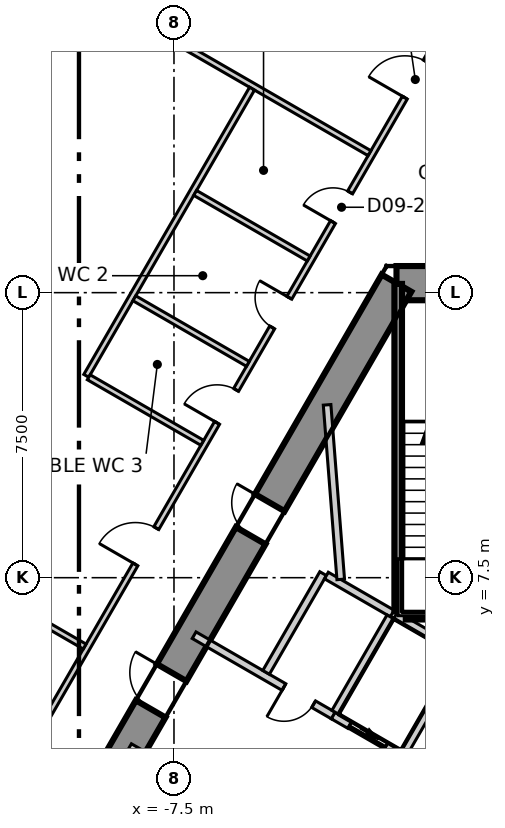
"""IFC4 building model, lengths in metres.
Left out: names, types, materials, properties, quantities, classifications, styles, units other than length and angle.
Written with IfcOpenShell. Run it as: python <this file> out.ifc"""

import sys

from ifc_helpers import new_model, si_unit, direction, frame, frame_2d, origin, place, context, subcontext, project, spatial, polyline, rectangle, outline, extrude, element, fill, save


model = new_model("IFC4")
c1 = context("Model", 3, precision=1e-05, world=origin(), true_north=direction((0.0, 1.0)))
c2 = subcontext(c1, "Body", "Model", "MODEL_VIEW")
j1 = project(units=[si_unit("LENGTHUNIT", "METRE"), si_unit("PLANEANGLEUNIT", "RADIAN")], contexts=[c1])
p1 = place(None, origin())
s1 = spatial("IfcSite", under=j1, at=p1, CompositionType="ELEMENT")
p2 = place(p1, origin())
s2 = spatial("IfcBuilding", under=s1, at=p2, CompositionType="ELEMENT")
p3 = place(p2, frame((0.0, 0.0, 47.3)))
s3 = spatial("IfcBuildingStorey", under=s2, at=p3, CompositionType="ELEMENT", Elevation=47.3)
p4 = place(p3, frame((1.645, 15.25, -0.3), z_axis=(0.0, 0.0, 1.0), x_axis=(-1.0, 0.0, 0.0)))
e1 = element("IfcWall", 1, at=p4, inside=s3, PredefinedType="SHEAR", context=c2, shape_type="SweptSolid", body=[
    extrude(outline(polyline([(-0.26, -0.45), (1.645, -0.45), (3.55, -0.45), (3.031, 0.45), (1.645, 0.45), (0.259, 0.45), (-0.26, -0.45)])), origin(), (0.0, 0.0, 1.0), 4.0),
])
p5 = place(p4, frame((0.945, 0.0, 0.3)))
e2 = element("IfcOpeningElement", 2, at=p5, cuts=e1, PredefinedType="OPENING", context=c2, shape_type="SweptSolid", body=[
    extrude(rectangle(XDim=1.4, YDim=2.1, at=frame_2d((0.7, 1.05))), frame((0.0, 0.46, 0.0), z_axis=(0.0, -1.0, 0.0), x_axis=(1.0, 0.0, 0.0)), (0.0, 0.0, 1.0), 0.92),
])
p6 = place(p3, frame((-1.645, 15.25, -0.3), z_axis=(0.0, 0.0, 1.0), x_axis=(-0.500026485275, -0.866010111964, 0.0)))
e3 = element("IfcWall", 3, at=p6, inside=s3, PredefinedType="SHEAR", context=c2, shape_type="SweptSolid", body=[
    extrude(outline(polyline([(-0.26, -0.45), (1.685, -0.45), (3.63, -0.45), (5.576, -0.45), (7.521, -0.45), (9.466, -0.449), (11.411, -0.449), (13.357, -0.449), (15.302, -0.449), (17.247, -0.449), (19.192, -0.449), (21.138, -0.449), (23.083, -0.449), (25.028, -0.449), (24.509, 0.45), (22.644, 0.45), (20.778, 0.45), (18.913, 0.45), (17.048, 0.45), (15.182, 0.449), (13.317, 0.449), (11.452, 0.449), (9.587, 0.449), (7.721, 0.449), (5.856, 0.449), (3.991, 0.449), (2.125, 0.449), (0.26, 0.449), (-0.26, -0.45)])), origin(), (0.0, 0.0, 1.0), 4.0),
])
p7 = place(p6, frame((11.834, 0.0, 0.3)))
e4 = element("IfcOpeningElement", 4, at=p7, cuts=e3, PredefinedType="OPENING", context=c2, shape_type="SweptSolid", body=[
    extrude(rectangle(XDim=1.1, YDim=2.1, at=frame_2d((0.55, 1.05))), frame((0.0, 0.46, 0.0), z_axis=(0.0, -1.0, 0.0), x_axis=(1.0, 0.0, 0.0)), (0.0, 0.0, 1.0), 0.92),
])
p8 = place(p6, frame((6.671, 0.0, 0.3)))
e5 = element("IfcOpeningElement", 5, at=p8, cuts=e3, PredefinedType="OPENING", context=c2, shape_type="SweptSolid", body=[
    extrude(rectangle(XDim=1.0, YDim=2.1, at=frame_2d((0.5, 1.05))), frame((0.0, 0.46, 0.0), z_axis=(0.0, -1.0, 0.0), x_axis=(1.0, 0.0, 0.0)), (0.0, 0.0, 1.0), 0.92),
])
p9 = place(p3, frame((-3.417, 38.096, 0.0), z_axis=(0.0, 0.0, 1.0), x_axis=(-0.500000412988, -0.866025165346, 0.0)))
e6 = element("IfcWall", 6, at=p9, inside=s3, PredefinedType="ELEMENTEDWALL", context=c2, shape_type="SweptSolid", body=[
    extrude(rectangle(XDim=62.548, YDim=0.2, at=frame_2d((31.274, 0.0))), origin(), (0.0, 0.0, 1.0), 3.7),
])
p10 = place(p9, frame((2.25, 0.0, 0.9)))
e7 = element("IfcOpeningElement", 7, at=p10, cuts=e6, PredefinedType="OPENING", context=c2, shape_type="SweptSolid", body=[
    extrude(rectangle(XDim=5.6, YDim=2.5, at=frame_2d((2.8, 1.25))), frame((0.0, 0.11, 0.0), z_axis=(0.0, -1.0, 0.0), x_axis=(1.0, 0.0, 0.0)), (0.0, 0.0, 1.0), 0.22),
])
p11 = place(p9, frame((9.745, 0.0, 0.9)))
e8 = element("IfcOpeningElement", 8, at=p11, cuts=e6, PredefinedType="OPENING", context=c2, shape_type="SweptSolid", body=[
    extrude(rectangle(XDim=5.6, YDim=2.5, at=frame_2d((2.8, 1.25))), frame((0.0, 0.11, 0.0), z_axis=(0.0, -1.0, 0.0), x_axis=(1.0, 0.0, 0.0)), (0.0, 0.0, 1.0), 0.22),
])
p12 = place(p9, frame((17.241, 0.0, 0.9)))
e9 = element("IfcOpeningElement", 9, at=p12, cuts=e6, PredefinedType="OPENING", context=c2, shape_type="SweptSolid", body=[
    extrude(rectangle(XDim=5.6, YDim=2.5, at=frame_2d((2.8, 1.25))), frame((0.0, 0.11, 0.0), z_axis=(0.0, -1.0, 0.0), x_axis=(1.0, 0.0, 0.0)), (0.0, 0.0, 1.0), 0.22),
])
p13 = place(p9, frame((24.736, 0.0, 0.9)))
e10 = element("IfcOpeningElement", 10, at=p13, cuts=e6, PredefinedType="OPENING", context=c2, shape_type="SweptSolid", body=[
    extrude(rectangle(XDim=5.6, YDim=2.5, at=frame_2d((2.8, 1.25))), frame((0.0, 0.11, 0.0), z_axis=(0.0, -1.0, 0.0), x_axis=(1.0, 0.0, 0.0)), (0.0, 0.0, 1.0), 0.22),
])
p14 = place(p9, frame((32.231, 0.0, 0.9)))
e11 = element("IfcOpeningElement", 11, at=p14, cuts=e6, PredefinedType="OPENING", context=c2, shape_type="SweptSolid", body=[
    extrude(rectangle(XDim=5.6, YDim=2.5, at=frame_2d((2.8, 1.25))), frame((0.0, 0.11, 0.0), z_axis=(0.0, -1.0, 0.0), x_axis=(1.0, 0.0, 0.0)), (0.0, 0.0, 1.0), 0.22),
])
p15 = place(p9, frame((39.727, 0.0, 0.9)))
e12 = element("IfcOpeningElement", 12, at=p15, cuts=e6, PredefinedType="OPENING", context=c2, shape_type="SweptSolid", body=[
    extrude(rectangle(XDim=5.6, YDim=2.5, at=frame_2d((2.8, 1.25))), frame((0.0, 0.11, 0.0), z_axis=(0.0, -1.0, 0.0), x_axis=(1.0, 0.0, 0.0)), (0.0, 0.0, 1.0), 0.22),
])
p16 = place(p9, frame((47.222, 0.0, 0.9)))
e13 = element("IfcOpeningElement", 13, at=p16, cuts=e6, PredefinedType="OPENING", context=c2, shape_type="SweptSolid", body=[
    extrude(rectangle(XDim=5.6, YDim=2.5, at=frame_2d((2.8, 1.25))), frame((0.0, 0.11, 0.0), z_axis=(0.0, -1.0, 0.0), x_axis=(1.0, 0.0, 0.0)), (0.0, 0.0, 1.0), 0.22),
])
p17 = place(p9, frame((54.717, 0.0, 0.9)))
e14 = element("IfcOpeningElement", 14, at=p17, cuts=e6, PredefinedType="OPENING", context=c2, shape_type="SweptSolid", body=[
    extrude(rectangle(XDim=5.6, YDim=2.5, at=frame_2d((2.8, 1.25))), frame((0.0, 0.11, 0.0), z_axis=(0.0, -1.0, 0.0), x_axis=(1.0, 0.0, 0.0)), (0.0, 0.0, 1.0), 0.22),
])
p18 = place(p3, frame((-19.497, -11.17, 0.0), z_axis=(0.0, 0.0, 1.0), x_axis=(0.499998854553, 0.866026065108, 0.0)))
e15 = element("IfcWall", 15, at=p18, inside=s3, PredefinedType="PARTITIONING", context=c2, shape_type="SweptSolid", body=[
    extrude(rectangle(XDim=38.994, YDim=0.15, at=frame_2d((19.497, 0.0))), origin(), (0.0, 0.0, 1.0), 3.7),
])
p19 = place(p18, frame((36.144, 0.0, 0.0)))
e16 = element("IfcOpeningElement", 16, at=p19, cuts=e15, PredefinedType="OPENING", context=c2, shape_type="SweptSolid", body=[
    extrude(rectangle(XDim=1.1, YDim=2.1, at=frame_2d((0.55, 1.05))), frame((0.0, 0.085, 0.0), z_axis=(0.0, -1.0, 0.0), x_axis=(1.0, 0.0, 0.0)), (0.0, 0.0, 1.0), 0.17),
])
p20 = place(p18, frame((21.963, 0.0, 0.0)))
e17 = element("IfcOpeningElement", 17, at=p20, cuts=e15, PredefinedType="OPENING", context=c2, shape_type="SweptSolid", body=[
    extrude(rectangle(XDim=1.1, YDim=2.1, at=frame_2d((0.55, 1.05))), frame((0.0, 0.085, 0.0), z_axis=(0.0, -1.0, 0.0), x_axis=(1.0, 0.0, 0.0)), (0.0, 0.0, 1.0), 0.17),
])
p21 = place(p18, frame((32.363, 0.0, 0.0)))
e18 = element("IfcOpeningElement", 18, at=p21, cuts=e15, PredefinedType="OPENING", context=c2, shape_type="SweptSolid", body=[
    extrude(rectangle(XDim=0.9, YDim=2.1, at=frame_2d((0.45, 1.05))), frame((0.0, 0.085, 0.0), z_axis=(0.0, -1.0, 0.0), x_axis=(1.0, 0.0, 0.0)), (0.0, 0.0, 1.0), 0.17),
])
p22 = place(p18, frame((29.163, 0.0, 0.0)))
e19 = element("IfcOpeningElement", 19, at=p22, cuts=e15, PredefinedType="OPENING", context=c2, shape_type="SweptSolid", body=[
    extrude(rectangle(XDim=0.9, YDim=2.1, at=frame_2d((0.45, 1.05))), frame((0.0, 0.085, 0.0), z_axis=(0.0, -1.0, 0.0), x_axis=(1.0, 0.0, 0.0)), (0.0, 0.0, 1.0), 0.17),
])
p23 = place(p18, frame((26.263, 0.0, 0.0)))
e20 = element("IfcOpeningElement", 20, at=p23, cuts=e15, PredefinedType="OPENING", context=c2, shape_type="SweptSolid", body=[
    extrude(rectangle(XDim=1.0, YDim=2.1, at=frame_2d((0.5, 1.05))), frame((0.0, 0.085, 0.0), z_axis=(0.0, -1.0, 0.0), x_axis=(1.0, 0.0, 0.0)), (0.0, 0.0, 1.0), 0.17),
])
p24 = place(p18, frame((11.373, 0.0, 0.0)))
e21 = element("IfcOpeningElement", 21, at=p24, cuts=e15, PredefinedType="OPENING", context=c2, shape_type="SweptSolid", body=[
    extrude(rectangle(XDim=1.1, YDim=2.1, at=frame_2d((0.55, 1.05))), frame((0.0, 0.085, 0.0), z_axis=(0.0, -1.0, 0.0), x_axis=(1.0, 0.0, 0.0)), (0.0, 0.0, 1.0), 0.17),
])
p25 = place(p18, frame((1.581, 0.0, 0.0)))
e22 = element("IfcOpeningElement", 22, at=p25, cuts=e15, PredefinedType="OPENING", context=c2, shape_type="SweptSolid", body=[
    extrude(rectangle(XDim=1.1, YDim=2.1, at=frame_2d((0.55, 1.05))), frame((0.0, 0.085, 0.0), z_axis=(0.0, -1.0, 0.0), x_axis=(1.0, 0.0, 0.0)), (0.0, 0.0, 1.0), 0.17),
])
p26 = place(p3, frame((-18.989, 10.964, 0.0), z_axis=(0.0, 0.0, 1.0), x_axis=(0.866011810196, -0.500023544047, 0.0)))
e23 = element("IfcWall", 23, at=p26, inside=s3, PredefinedType="PARTITIONING", context=c2, shape_type="SweptSolid", body=[
    extrude(rectangle(XDim=10.552, YDim=0.15, at=frame_2d((5.276, 0.0))), origin(), (0.0, 0.0, 1.0), 3.2),
])
p27 = place(p3, frame((-11.494, 23.946, 0.0), z_axis=(0.0, 0.0, 1.0), x_axis=(0.866011810196, -0.500023544047, 0.0)))
e24 = element("IfcWall", 24, at=p27, inside=s3, PredefinedType="PARTITIONING", context=c2, shape_type="SweptSolid", body=[
    extrude(rectangle(XDim=10.552, YDim=0.15, at=frame_2d((5.276, 0.0))), origin(), (0.0, 0.0, 1.0), 3.7),
])
p28 = place(p3, frame((-9.808, 12.811, 0.0), z_axis=(0.0, 0.0, 1.0), x_axis=(0.49992187278, 0.866070505857, 0.0)))
e25 = element("IfcWall", 25, at=p28, inside=s3, PredefinedType="PARTITIONING", context=c2, shape_type="SweptSolid", body=[
    extrude(rectangle(XDim=8.726, YDim=0.15, at=frame_2d((4.363, 0.0))), origin(), (0.0, 0.0, 1.0), 3.7),
])
p29 = place(p3, frame((-9.743, 12.774, 0.0), z_axis=(0.0, 0.0, 1.0), x_axis=(0.865973391227, -0.500090077572, 0.0)))
e26 = element("IfcWall", 26, at=p29, inside=s3, PredefinedType="PARTITIONING", context=c2, shape_type="SweptSolid", body=[
    extrude(rectangle(XDim=3.449, YDim=0.15, at=frame_2d((1.725, 0.0))), origin(), (0.0, 0.0, 1.0), 3.7),
])
for number, where, z_axis, x_axis in (
    (27, (-8.543, 14.852, 0.0), (0.0, 0.0, 1.0), (0.866, -0.5, 0.0)),
    (28, (-6.943, 17.624, 0.0), (0.0, 0.0, 1.0), (0.866, -0.5, 0.0)),
):
    element("IfcWall", number, at=place(p3, frame(where, z_axis=z_axis, x_axis=x_axis)), inside=s3, PredefinedType="PARTITIONING", context=c2, shape_type="SweptSolid", body=[
        extrude(rectangle(XDim=3.449, YDim=0.15, at=frame_2d((1.725, 0.0))), origin(), (0.0, 0.0, 1.0), 3.7),
    ])
p30 = place(p3, frame((-8.67, 3.043, 0.0), z_axis=(0.0, 0.0, 1.0), x_axis=(0.866029956157, -0.499992114976, 0.0)))
e29 = element("IfcWall", 29, at=p30, inside=s3, PredefinedType="SOLIDWALL", context=c2, shape_type="SweptSolid", body=[
    extrude(rectangle(XDim=4.232, YDim=0.2, at=frame_2d((2.116, 0.0))), origin(), (0.0, 0.0, 1.0), 3.7),
])
p31 = place(p30, frame((2.63, 0.0, 0.0)))
e30 = element("IfcOpeningElement", 30, at=p31, cuts=e29, PredefinedType="OPENING", context=c2, shape_type="SweptSolid", body=[
    extrude(rectangle(XDim=1.1, YDim=2.1, at=frame_2d((0.55, 1.05))), frame((0.0, 0.11, 0.0), z_axis=(0.0, -1.0, 0.0), x_axis=(1.0, 0.0, 0.0)), (0.0, 0.0, 1.0), 0.22),
])
p32 = place(p3, frame((-6.97, 5.987, 0.0), z_axis=(0.0, 0.0, 1.0), x_axis=(0.866029956157, -0.499992114976, 0.0)))
e31 = element("IfcWall", 31, at=p32, inside=s3, PredefinedType="SOLIDWALL", context=c2, shape_type="SweptSolid", body=[
    extrude(rectangle(XDim=4.232, YDim=0.2, at=frame_2d((2.116, 0.0))), origin(), (0.0, 0.0, 1.0), 3.7),
])
p33 = place(p32, frame((2.73, 0.0, 0.0)))
e32 = element("IfcOpeningElement", 32, at=p33, cuts=e31, PredefinedType="OPENING", context=c2, shape_type="SweptSolid", body=[
    extrude(rectangle(XDim=0.9, YDim=2.1, at=frame_2d((0.45, 1.05))), frame((0.0, 0.11, 0.0), z_axis=(0.0, -1.0, 0.0), x_axis=(1.0, 0.0, 0.0)), (0.0, 0.0, 1.0), 0.22),
])
p34 = place(p3, frame((-5.076, 5.009, 0.0), z_axis=(0.0, 0.0, 1.0), x_axis=(0.50002537861, 0.866010750942, 0.0)))
e33 = element("IfcWall", 33, at=p34, inside=s3, PredefinedType="SOLIDWALL", context=c2, shape_type="SweptSolid", body=[
    extrude(rectangle(XDim=3.0, YDim=0.2, at=frame_2d((1.5, 0.0))), origin(), (0.0, 0.0, 1.0), 3.7),
])
p35 = place(p3, frame((-3.489, 7.557, 0.0), z_axis=(0.0, 0.0, 1.0), x_axis=(0.866010750942, -0.50002537861, 0.0)))
e34 = element("IfcWall", 34, at=p35, inside=s3, PredefinedType="SOLIDWALL", context=c2, shape_type="SweptSolid", body=[
    extrude(rectangle(XDim=2.0, YDim=0.2, at=frame_2d((1.0, 0.0))), origin(), (0.0, 0.0, 1.0), 3.7),
])
p36 = place(p3, frame((-3.309, 3.873, 0.0), z_axis=(0.0, 0.0, 1.0), x_axis=(0.866098583652, -0.499873227325, 0.0)))
e35 = element("IfcWall", 35, at=p36, inside=s3, PredefinedType="SOLIDWALL", context=c2, shape_type="SweptSolid", body=[
    extrude(rectangle(XDim=2.103, YDim=0.2, at=frame_2d((1.051, 0.0))), origin(), (0.0, 0.0, 1.0), 3.7),
])
p37 = place(p36, frame((0.502, 0.0, 0.0)))
e36 = element("IfcOpeningElement", 36, at=p37, cuts=e35, PredefinedType="OPENING", context=c2, shape_type="SweptSolid", body=[
    extrude(rectangle(XDim=1.1, YDim=2.1, at=frame_2d((0.55, 1.05))), frame((0.0, 0.11, 0.0), z_axis=(0.0, -1.0, 0.0), x_axis=(1.0, 0.0, 0.0)), (0.0, 0.0, 1.0), 0.22),
])
p38 = place(p3, frame((-3.257, 3.959, 0.0), z_axis=(0.0, 0.0, 1.0), x_axis=(0.50012328804, 0.865954211699, 0.0)))
e37 = element("IfcWall", 37, at=p38, inside=s3, PredefinedType="SOLIDWALL", context=c2, shape_type="SweptSolid", body=[
    extrude(rectangle(XDim=2.9, YDim=0.2, at=frame_2d((1.45, 0.0))), origin(), (0.0, 0.0, 1.0), 3.7),
])
p39 = place(p3, frame((-1.67, 6.507, 0.0), z_axis=(0.0, 0.0, 1.0), x_axis=(0.865941441609, -0.500145398563, 0.0)))
e38 = element("IfcWall", 38, at=p39, inside=s3, PredefinedType="SOLIDWALL", context=c2, shape_type="SweptSolid", body=[
    extrude(rectangle(XDim=1.815, YDim=0.2, at=frame_2d((0.908, 0.0))), origin(), (0.0, 0.0, 1.0), 3.7),
])
p40 = place(p3, frame((-1.438, 2.909, 0.0), z_axis=(0.0, 0.0, 1.0), x_axis=(0.499829630636, 0.866123744241, 0.0)))
e39 = element("IfcWall", 39, at=p40, inside=s3, PredefinedType="SOLIDWALL", context=c2, shape_type="SweptSolid", body=[
    extrude(rectangle(XDim=2.761, YDim=0.2, at=frame_2d((1.38, 0.0))), origin(), (0.0, 0.0, 1.0), 3.7),
])
p41 = place(p3, frame((-3.471, 12.048, 0.0), z_axis=(0.0, 0.0, 1.0), x_axis=(0.077900012222, -0.996961176825, 0.0)))
e40 = element("IfcWall", 40, at=p41, inside=s3, PredefinedType="SOLIDWALL", context=c2, shape_type="SweptSolid", body=[
    extrude(rectangle(XDim=4.607, YDim=0.2, at=frame_2d((2.303, 0.0))), origin(), (0.0, 0.0, 1.0), 3.7),
])
p42 = place(p3, frame((-1.4, 6.5, 0.0), z_axis=(0.0, 0.0, 1.0), x_axis=(1.0, 0.0, 0.0)))
e41 = element("IfcWall", 41, at=p42, inside=s3, PredefinedType="SOLIDWALL", context=c2, shape_type="SweptSolid", body=[
    extrude(rectangle(XDim=2.8, YDim=0.2, at=frame_2d((1.4, 0.0))), origin(), (0.0, 0.0, 1.0), 3.7),
])
p43 = place(p3, frame((-1.6, 6.615, 0.0), z_axis=(0.0, 0.0, 1.0), x_axis=(0.0, 1.0, 0.0)))
e42 = element("IfcWall", 42, at=p43, inside=s3, PredefinedType="SOLIDWALL", context=c2, shape_type="SweptSolid", body=[
    extrude(rectangle(XDim=8.615, YDim=0.2, at=frame_2d((4.308, 0.0))), origin(), (0.0, 0.0, 1.0), 3.7),
])
p44 = place(p37, origin())
e43 = element("IfcDoor", 43, at=p44, inside=s3, OperationType="SLIDING_TO_LEFT", PredefinedType="DOOR", context=c2, shape_type="SweptSolid", body=[
    extrude(rectangle(XDim=1.1, YDim=2.1, at=frame_2d((0.55, 1.05))), frame((0.0, 0.025, 0.0), z_axis=(0.0, -1.0, 0.0), x_axis=(1.0, 0.0, 0.0)), (0.0, 0.0, 1.0), 0.05),
])
fill(e36, e43)
p45 = place(p33, origin())
e44 = element("IfcDoor", 44, at=p45, inside=s3, OperationType="SINGLE_SWING_LEFT", PredefinedType="DOOR", context=c2, shape_type="SweptSolid", body=[
    extrude(rectangle(XDim=0.9, YDim=2.1, at=frame_2d((0.45, 1.05))), frame((0.0, 0.025, 0.0), z_axis=(0.0, -1.0, 0.0), x_axis=(1.0, 0.0, 0.0)), (0.0, 0.0, 1.0), 0.05),
])
fill(e32, e44)
p46 = place(p19, origin())
e45 = element("IfcDoor", 45, at=p46, inside=s3, OperationType="SINGLE_SWING_RIGHT", PredefinedType="DOOR", context=c2, shape_type="SweptSolid", body=[
    extrude(rectangle(XDim=1.1, YDim=2.1, at=frame_2d((0.55, 1.05))), frame((0.0, 0.025, 0.0), z_axis=(0.0, -1.0, 0.0), x_axis=(1.0, 0.0, 0.0)), (0.0, 0.0, 1.0), 0.05),
])
fill(e16, e45)
p47 = place(p20, origin())
e46 = element("IfcDoor", 46, at=p47, inside=s3, OperationType="SINGLE_SWING_RIGHT", PredefinedType="DOOR", context=c2, shape_type="SweptSolid", body=[
    extrude(rectangle(XDim=1.1, YDim=2.1, at=frame_2d((0.55, 1.05))), frame((0.0, 0.025, 0.0), z_axis=(0.0, -1.0, 0.0), x_axis=(1.0, 0.0, 0.0)), (0.0, 0.0, 1.0), 0.05),
])
fill(e17, e46)
p48 = place(p21, origin())
e47 = element("IfcDoor", 47, at=p48, inside=s3, OperationType="SINGLE_SWING_RIGHT", PredefinedType="DOOR", context=c2, shape_type="SweptSolid", body=[
    extrude(rectangle(XDim=0.9, YDim=2.1, at=frame_2d((0.45, 1.05))), frame((0.0, 0.025, 0.0), z_axis=(0.0, -1.0, 0.0), x_axis=(1.0, 0.0, 0.0)), (0.0, 0.0, 1.0), 0.05),
])
fill(e18, e47)
p49 = place(p22, origin())
e48 = element("IfcDoor", 48, at=p49, inside=s3, OperationType="SINGLE_SWING_LEFT", PredefinedType="DOOR", context=c2, shape_type="SweptSolid", body=[
    extrude(rectangle(XDim=0.9, YDim=2.1, at=frame_2d((0.45, 1.05))), frame((0.0, 0.025, 0.0), z_axis=(0.0, -1.0, 0.0), x_axis=(1.0, 0.0, 0.0)), (0.0, 0.0, 1.0), 0.05),
])
fill(e19, e48)
p50 = place(p23, origin())
e49 = element("IfcDoor", 49, at=p50, inside=s3, OperationType="SINGLE_SWING_RIGHT", PredefinedType="DOOR", context=c2, shape_type="SweptSolid", body=[
    extrude(rectangle(XDim=1.0, YDim=2.1, at=frame_2d((0.5, 1.05))), frame((0.0, 0.025, 0.0), z_axis=(0.0, -1.0, 0.0), x_axis=(1.0, 0.0, 0.0)), (0.0, 0.0, 1.0), 0.05),
])
fill(e20, e49)
p51 = place(p7, origin())
e50 = element("IfcDoor", 50, at=p51, inside=s3, OperationType="SINGLE_SWING_LEFT", PredefinedType="DOOR", context=c2, shape_type="SweptSolid", body=[
    extrude(rectangle(XDim=1.1, YDim=2.1, at=frame_2d((0.55, 1.05))), frame((0.0, 0.025, 0.0), z_axis=(0.0, -1.0, 0.0), x_axis=(1.0, 0.0, 0.0)), (0.0, 0.0, 1.0), 0.05),
])
fill(e4, e50)
p52 = place(p8, origin())
e51 = element("IfcDoor", 51, at=p52, inside=s3, OperationType="SINGLE_SWING_LEFT", PredefinedType="DOOR", context=c2, shape_type="SweptSolid", body=[
    extrude(rectangle(XDim=1.0, YDim=2.1, at=frame_2d((0.5, 1.05))), frame((0.0, 0.025, 0.0), z_axis=(0.0, -1.0, 0.0), x_axis=(1.0, 0.0, 0.0)), (0.0, 0.0, 1.0), 0.05),
])
fill(e5, e51)
save(model, sys.argv[1])
